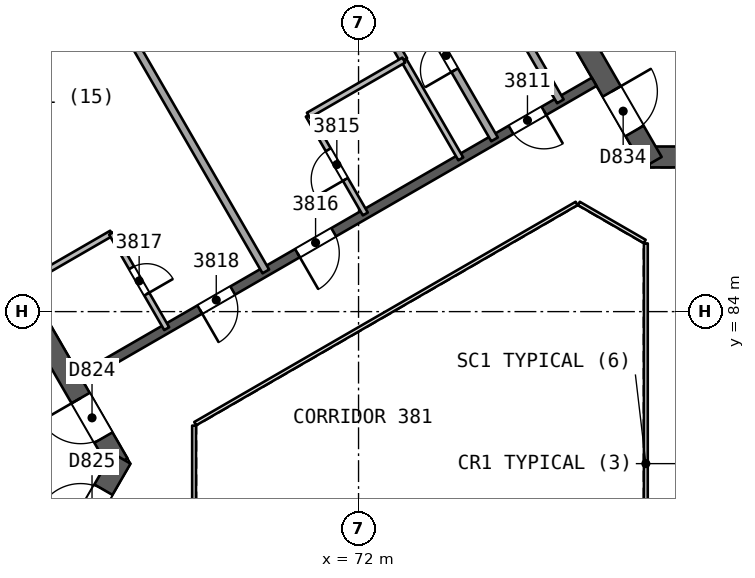
"""IFC4 building model, lengths in metres.
Left out: names, types, materials, properties, quantities, classifications, styles, units other than length and angle.
Written with IfcOpenShell. Run it as: python <this file> out.ifc"""

import sys

from ifc_helpers import new_model, si_unit, direction, frame, frame_2d, origin, place, context, subcontext, project, spatial, rectangle, extrude, element, fill, save


model = new_model("IFC4")
c1 = context("Model", 3, precision=1e-05, world=origin(), true_north=direction((0.0, 1.0)))
c2 = subcontext(c1, "Body", "Model", "MODEL_VIEW")
j1 = project(units=[si_unit("LENGTHUNIT", "METRE"), si_unit("PLANEANGLEUNIT", "RADIAN")], contexts=[c1])
p1 = place(None, origin())
s1 = spatial("IfcSite", under=j1, at=p1, CompositionType="ELEMENT")
p2 = place(p1, origin())
s2 = spatial("IfcBuilding", under=s1, at=p2, CompositionType="ELEMENT")
p3 = place(p2, frame((0.0, 0.0, 160.0)))
s3 = spatial("IfcBuildingStorey", under=s2, at=p3, CompositionType="ELEMENT", Elevation=160.0)
p4 = place(p3, frame((65.682, 80.0, 0.0), z_axis=(0.0, 0.0, 1.0), x_axis=(-0.500000202252, 0.866025287014, 0.0)))
e1 = element("IfcWall", 1, at=p4, inside=s3, PredefinedType="SHEAR", context=c2, shape_type="SweptSolid", body=[
    extrude(rectangle(XDim=10.221, YDim=0.55, at=frame_2d((5.111, 0.0))), origin(), (0.0, 0.0, 1.0), 3.7),
])
p5 = place(p4, frame((0.791, 0.0, 0.0)))
e2 = element("IfcOpeningElement", 2, at=p5, cuts=e1, PredefinedType="OPENING", context=c2, shape_type="SweptSolid", body=[
    extrude(rectangle(XDim=1.2, YDim=2.1, at=frame_2d((0.6, 1.05))), frame((0.0, 0.286, 0.0), z_axis=(0.0, -1.0, 0.0), x_axis=(1.0, 0.0, 0.0)), (0.0, 0.0, 1.0), 0.571),
])
p6 = place(p3, frame((60.709, 71.386, 0.0), z_axis=(0.0, 0.0, 1.0), x_axis=(0.500015938302, 0.866016201606, 0.0)))
e3 = element("IfcWall", 3, at=p6, inside=s3, PredefinedType="SHEAR", context=c2, shape_type="SweptSolid", body=[
    extrude(rectangle(XDim=10.105, YDim=0.55, at=frame_2d((5.053, 0.0))), origin(), (0.0, 0.0, 1.0), 3.7),
])
p7 = place(p6, frame((7.955, 0.0, 0.0)))
e4 = element("IfcOpeningElement", 4, at=p7, cuts=e3, PredefinedType="OPENING", context=c2, shape_type="SweptSolid", body=[
    extrude(rectangle(XDim=1.2, YDim=2.1, at=frame_2d((0.6, 1.05))), frame((0.0, 0.286, 0.0), z_axis=(0.0, -1.0, 0.0), x_axis=(1.0, 0.0, 0.0)), (0.0, 0.0, 1.0), 0.571),
])
p8 = place(p3, frame((79.659, 88.069, 0.0), z_axis=(0.0, 0.0, 1.0), x_axis=(1.0, 0.0, 0.0)))
e5 = element("IfcWall", 5, at=p8, inside=s3, PredefinedType="SHEAR", context=c2, shape_type="SweptSolid", body=[
    extrude(rectangle(XDim=10.221, YDim=0.55, at=frame_2d((5.111, 0.0))), origin(), (0.0, 0.0, 1.0), 3.7),
])
p9 = place(p8, frame((0.791, 0.0, 0.0)))
e6 = element("IfcOpeningElement", 6, at=p9, cuts=e5, PredefinedType="OPENING", context=c2, shape_type="SweptSolid", body=[
    extrude(rectangle(XDim=1.2, YDim=2.1, at=frame_2d((0.6, 1.05))), frame((0.0, 0.286, 0.0), z_axis=(0.0, -1.0, 0.0), x_axis=(1.0, 0.0, 0.0)), (0.0, 0.0, 1.0), 0.571),
])
p10 = place(p3, frame((74.686, 96.683, 0.0), z_axis=(0.0, 0.0, 1.0), x_axis=(0.499997818338, -0.866026663364, 0.0)))
e7 = element("IfcWall", 7, at=p10, inside=s3, PredefinedType="SHEAR", context=c2, shape_type="SweptSolid", body=[
    extrude(rectangle(XDim=10.105, YDim=0.55, at=frame_2d((5.052, 0.0))), origin(), (0.0, 0.0, 1.0), 3.7),
])
p11 = place(p10, frame((7.955, 0.0, 0.0)))
e8 = element("IfcOpeningElement", 8, at=p11, cuts=e7, PredefinedType="OPENING", context=c2, shape_type="SweptSolid", body=[
    extrude(rectangle(XDim=1.2, YDim=2.1, at=frame_2d((0.6, 1.05))), frame((0.0, 0.286, 0.0), z_axis=(0.0, -1.0, 0.0), x_axis=(1.0, 0.0, 0.0)), (0.0, 0.0, 1.0), 0.571),
])
p12 = place(p3, frame((78.2, 90.046, 0.0), z_axis=(0.0, 0.0, 1.0), x_axis=(-0.866026492143, -0.499998114903, 0.0)))
e9 = element("IfcWall", 9, at=p12, inside=s3, PredefinedType="SHEAR", context=c2, shape_type="SweptSolid", body=[
    extrude(rectangle(XDim=15.588, YDim=0.25, at=frame_2d((7.794, 0.0))), origin(), (0.0, 0.0, 1.0), 3.25),
])
p13 = place(p12, frame((1.527, 0.0, 0.0)))
e10 = element("IfcOpeningElement", 10, at=p13, cuts=e9, PredefinedType="OPENING", context=c2, shape_type="SweptSolid", body=[
    extrude(rectangle(XDim=1.0, YDim=2.1, at=frame_2d((0.5, 1.05))), frame((0.0, 0.135, 0.0), z_axis=(0.0, -1.0, 0.0), x_axis=(1.0, 0.0, 0.0)), (0.0, 0.0, 1.0), 0.271),
])
p14 = place(p12, frame((7.915, 0.0, 0.0)))
e11 = element("IfcOpeningElement", 11, at=p14, cuts=e9, PredefinedType="OPENING", context=c2, shape_type="SweptSolid", body=[
    extrude(rectangle(XDim=1.1, YDim=2.1, at=frame_2d((0.55, 1.05))), frame((0.0, 0.135, 0.0), z_axis=(0.0, -1.0, 0.0), x_axis=(1.0, 0.0, 0.0)), (0.0, 0.0, 1.0), 0.271),
])
p15 = place(p12, frame((10.982, 0.0, 0.0)))
e12 = element("IfcOpeningElement", 12, at=p15, cuts=e9, PredefinedType="OPENING", context=c2, shape_type="SweptSolid", body=[
    extrude(rectangle(XDim=1.0, YDim=2.1, at=frame_2d((0.5, 1.05))), frame((0.0, 0.135, 0.0), z_axis=(0.0, -1.0, 0.0), x_axis=(1.0, 0.0, 0.0)), (0.0, 0.0, 1.0), 0.271),
])
p16 = place(p3, frame((75.579, 88.533, 0.0), z_axis=(0.0, 0.0, 1.0), x_axis=(-0.5000018851, 0.866024315419, 0.0)))
e13 = element("IfcWall", 13, at=p16, inside=s3, PredefinedType="PARTITIONING", context=c2, shape_type="SweptSolid", body=[
    extrude(rectangle(XDim=9.0, YDim=0.2, at=frame_2d((4.5, 0.0))), origin(), (0.0, 0.0, 1.0), 3.25),
])
p17 = place(p16, frame((2.1, 0.0, 0.0)))
e14 = element("IfcOpeningElement", 14, at=p17, cuts=e13, PredefinedType="OPENING", context=c2, shape_type="SweptSolid", body=[
    extrude(rectangle(XDim=0.9, YDim=2.1, at=frame_2d((0.45, 1.05))), frame((0.0, 0.11, 0.0), z_axis=(0.0, -1.0, 0.0), x_axis=(1.0, 0.0, 0.0)), (0.0, 0.0, 1.0), 0.221),
])
p18 = place(p3, frame((72.811, 97.327, 0.0), z_axis=(0.0, 0.0, 1.0), x_axis=(0.5000018851, -0.866024315419, 0.0)))
e15 = element("IfcWall", 15, at=p18, inside=s3, PredefinedType="PARTITIONING", context=c2, shape_type="SweptSolid", body=[
    extrude(rectangle(XDim=9.0, YDim=0.2, at=frame_2d((4.5, 0.0))), origin(), (0.0, 0.0, 1.0), 3.25),
])
p19 = place(p3, frame((68.877, 98.088, 0.0), z_axis=(0.0, 0.0, 1.0), x_axis=(0.500001735503, -0.866024401789, 0.0)))
e16 = element("IfcWall", 16, at=p19, inside=s3, PredefinedType="PARTITIONING", context=c2, shape_type="SweptSolid", body=[
    extrude(rectangle(XDim=8.626, YDim=0.2, at=frame_2d((4.313, 0.0))), origin(), (0.0, 0.0, 1.0), 3.25),
])
p20 = place(p3, frame((73.19, 90.617, 0.0), z_axis=(0.0, 0.0, 1.0), x_axis=(0.499990139034, -0.866031096941, 0.0)))
e17 = element("IfcWall", 17, at=p20, inside=s3, PredefinedType="PARTITIONING", context=c2, shape_type="SweptSolid", body=[
    extrude(rectangle(XDim=3.0, YDim=0.15, at=frame_2d((1.5, 0.0))), origin(), (0.0, 0.0, 1.0), 3.25),
])
p21 = place(p3, frame((72.178, 86.569, 0.0), z_axis=(0.0, 0.0, 1.0), x_axis=(-0.499990139034, 0.866031096941, 0.0)))
e18 = element("IfcWall", 18, at=p21, inside=s3, PredefinedType="PARTITIONING", context=c2, shape_type="SweptSolid", body=[
    extrude(rectangle(XDim=3.0, YDim=0.15, at=frame_2d((1.5, 0.0))), origin(), (0.0, 0.0, 1.0), 3.25),
])
p22 = place(p21, frame((1.05, 0.0, 0.0)))
e19 = element("IfcOpeningElement", 19, at=p22, cuts=e18, PredefinedType="OPENING", context=c2, shape_type="SweptSolid", body=[
    extrude(rectangle(XDim=0.9, YDim=2.1, at=frame_2d((0.45, 1.05))), frame((0.0, 0.085, 0.0), z_axis=(0.0, -1.0, 0.0), x_axis=(1.0, 0.0, 0.0)), (0.0, 0.0, 1.0), 0.171),
])
p23 = place(p3, frame((70.678, 89.167, 0.0), z_axis=(0.0, 0.0, 1.0), x_axis=(0.866032775405, 0.499987231761, 0.0)))
e20 = element("IfcWall", 20, at=p23, inside=s3, PredefinedType="PARTITIONING", context=c2, shape_type="SweptSolid", body=[
    extrude(rectangle(XDim=2.9, YDim=0.15, at=frame_2d((1.45, 0.0))), origin(), (0.0, 0.0, 1.0), 3.25),
])
p24 = place(p3, frame((63.747, 95.126, 0.0), z_axis=(0.0, 0.0, 1.0), x_axis=(0.4999987432, -0.866026129397, 0.0)))
e21 = element("IfcWall", 21, at=p24, inside=s3, PredefinedType="PARTITIONING", context=c2, shape_type="SweptSolid", body=[
    extrude(rectangle(XDim=11.626, YDim=0.2, at=frame_2d((5.813, 0.0))), origin(), (0.0, 0.0, 1.0), 3.25),
])
p25 = place(p3, frame((63.422, 84.863, 0.0), z_axis=(0.0, 0.0, 1.0), x_axis=(0.865994240961, 0.500053971709, 0.0)))
e22 = element("IfcWall", 22, at=p25, inside=s3, PredefinedType="PARTITIONING", context=c2, shape_type="SweptSolid", body=[
    extrude(rectangle(XDim=2.401, YDim=0.15, at=frame_2d((1.201, 0.0))), origin(), (0.0, 0.0, 1.0), 3.25),
])
p26 = place(p3, frame((65.502, 86.063, 0.0), z_axis=(0.0, 0.0, 1.0), x_axis=(0.499987231761, -0.866032775405, 0.0)))
e23 = element("IfcWall", 23, at=p26, inside=s3, PredefinedType="PARTITIONING", context=c2, shape_type="SweptSolid", body=[
    extrude(rectangle(XDim=2.9, YDim=0.15, at=frame_2d((1.45, 0.0))), origin(), (0.0, 0.0, 1.0), 3.25),
])
p27 = place(p26, frame((1.05, 0.0, 0.0)))
e24 = element("IfcOpeningElement", 24, at=p27, cuts=e23, PredefinedType="OPENING", context=c2, shape_type="SweptSolid", body=[
    extrude(rectangle(XDim=0.8, YDim=2.1, at=frame_2d((0.4, 1.05))), frame((0.0, 0.085, 0.0), z_axis=(0.0, -1.0, 0.0), x_axis=(1.0, 0.0, 0.0)), (0.0, 0.0, 1.0), 0.171),
])
p28 = place(p3, frame((42.059, 82.777, 0.0), z_axis=(0.0, 0.0, 1.0), x_axis=(0.866025745652, 0.499999407868, 0.0)))
e25 = element("IfcWall", 25, at=p28, inside=s3, PredefinedType="SOLIDWALL", context=c2, shape_type="SweptSolid", body=[
    extrude(rectangle(XDim=54.279, YDim=0.3, at=frame_2d((27.14, 0.0))), origin(), (0.0, 0.0, 1.0), 3.25),
])
p29 = place(p28, frame((26.719, 0.0, 0.0)))
e26 = element("IfcOpeningElement", 26, at=p29, cuts=e25, PredefinedType="OPENING", context=c2, shape_type="SweptSolid", body=[
    extrude(rectangle(XDim=2.4, YDim=2.4, at=frame_2d((1.2, 1.2))), frame((0.0, 0.161, 0.0), z_axis=(0.0, -1.0, 0.0), x_axis=(1.0, 0.0, 0.0)), (0.0, 0.0, 1.0), 0.321),
])
p30 = place(p28, frame((31.708, 0.0, 0.0)))
e27 = element("IfcOpeningElement", 27, at=p30, cuts=e25, PredefinedType="OPENING", context=c2, shape_type="SweptSolid", body=[
    extrude(rectangle(XDim=2.4, YDim=2.4, at=frame_2d((1.2, 1.2))), frame((0.0, 0.161, 0.0), z_axis=(0.0, -1.0, 0.0), x_axis=(1.0, 0.0, 0.0)), (0.0, 0.0, 1.0), 0.321),
])
p31 = place(p28, frame((42.175, 0.0, 0.0)))
e28 = element("IfcOpeningElement", 28, at=p31, cuts=e25, PredefinedType="OPENING", context=c2, shape_type="SweptSolid", body=[
    extrude(rectangle(XDim=2.4, YDim=2.4, at=frame_2d((1.2, 1.2))), frame((0.0, 0.161, 0.0), z_axis=(0.0, -1.0, 0.0), x_axis=(1.0, 0.0, 0.0)), (0.0, 0.0, 1.0), 0.321),
])
p32 = place(p28, frame((11.235, 0.0, 0.0)))
e29 = element("IfcOpeningElement", 29, at=p32, cuts=e25, PredefinedType="OPENING", context=c2, shape_type="SweptSolid", body=[
    extrude(rectangle(XDim=2.4, YDim=2.4, at=frame_2d((1.2, 1.2))), frame((0.0, 0.161, 0.0), z_axis=(0.0, -1.0, 0.0), x_axis=(1.0, 0.0, 0.0)), (0.0, 0.0, 1.0), 0.321),
])
p33 = place(p3, frame((86.77, 89.486, 0.0), z_axis=(0.0, 0.0, 1.0), x_axis=(-0.86601811187, 0.500012629753, 0.0)))
e30 = element("IfcWall", 30, at=p33, inside=s3, PredefinedType="SOLIDWALL", context=c2, shape_type="SweptSolid", body=[
    extrude(rectangle(XDim=10.9, YDim=0.2, at=frame_2d((5.45, 0.0))), origin(), (0.0, 0.0, 1.0), 3.25),
])
p34 = place(p33, frame((0.575, 0.0, 0.0)))
e31 = element("IfcOpeningElement", 31, at=p34, cuts=e30, PredefinedType="OPENING", context=c2, shape_type="SweptSolid", body=[
    extrude(rectangle(XDim=1.1, YDim=2.1, at=frame_2d((0.55, 1.05))), frame((0.0, 0.11, 0.0), z_axis=(0.0, -1.0, 0.0), x_axis=(1.0, 0.0, 0.0)), (0.0, 0.0, 1.0), 0.221),
])
p35 = place(p33, frame((2.825, 0.0, 0.0)))
e32 = element("IfcOpeningElement", 32, at=p35, cuts=e30, PredefinedType="OPENING", context=c2, shape_type="SweptSolid", body=[
    extrude(rectangle(XDim=1.1, YDim=2.1, at=frame_2d((0.55, 1.05))), frame((0.0, 0.11, 0.0), z_axis=(0.0, -1.0, 0.0), x_axis=(1.0, 0.0, 0.0)), (0.0, 0.0, 1.0), 0.221),
])
p36 = place(p33, frame((5.075, 0.0, 0.0)))
e33 = element("IfcOpeningElement", 33, at=p36, cuts=e30, PredefinedType="OPENING", context=c2, shape_type="SweptSolid", body=[
    extrude(rectangle(XDim=1.1, YDim=2.1, at=frame_2d((0.55, 1.05))), frame((0.0, 0.11, 0.0), z_axis=(0.0, -1.0, 0.0), x_axis=(1.0, 0.0, 0.0)), (0.0, 0.0, 1.0), 0.221),
])
p37 = place(p33, frame((7.325, 0.0, 0.0)))
e34 = element("IfcOpeningElement", 34, at=p37, cuts=e30, PredefinedType="OPENING", context=c2, shape_type="SweptSolid", body=[
    extrude(rectangle(XDim=1.1, YDim=2.1, at=frame_2d((0.55, 1.05))), frame((0.0, 0.11, 0.0), z_axis=(0.0, -1.0, 0.0), x_axis=(1.0, 0.0, 0.0)), (0.0, 0.0, 1.0), 0.221),
])
p38 = place(p3, frame((89.33, 90.872, 0.0), z_axis=(0.0, 0.0, 1.0), x_axis=(-0.866027589512, 0.49999621419, 0.0)))
e35 = element("IfcWall", 35, at=p38, inside=s3, PredefinedType="SOLIDWALL", context=c2, shape_type="SweptSolid", body=[
    extrude(rectangle(XDim=10.524, YDim=0.2, at=frame_2d((5.262, 0.0))), origin(), (0.0, 0.0, 1.0), 3.25),
])
p39 = place(p38, frame((0.312, 0.0, 0.0)))
e36 = element("IfcOpeningElement", 36, at=p39, cuts=e35, PredefinedType="OPENING", context=c2, shape_type="SweptSolid", body=[
    extrude(rectangle(XDim=0.9, YDim=2.1, at=frame_2d((0.45, 1.05))), frame((0.0, 0.11, 0.0), z_axis=(0.0, -1.0, 0.0), x_axis=(1.0, 0.0, 0.0)), (0.0, 0.0, 1.0), 0.221),
])
p40 = place(p3, frame((79.56, 74.206, 0.0), z_axis=(0.0, 0.0, 1.0), x_axis=(0.0, 1.0, 0.0)))
e37 = element("IfcWall", 37, at=p40, inside=s3, PredefinedType="PARTITIONING", context=c2, shape_type="SweptSolid", body=[
    extrude(rectangle(XDim=11.588, YDim=0.1, at=frame_2d((5.794, 0.0))), origin(), (0.0, 0.0, 1.0), 3.25),
])
p41 = place(p3, frame((79.53, 85.846, 0.0), z_axis=(0.0, 0.0, 1.0), x_axis=(-0.866041268327, 0.499972520799, 0.0)))
e38 = element("IfcWall", 38, at=p41, inside=s3, PredefinedType="PARTITIONING", context=c2, shape_type="SweptSolid", body=[
    extrude(rectangle(XDim=2.0, YDim=0.1, at=frame_2d((1.0, 0.0))), origin(), (0.0, 0.0, 1.0), 3.25),
])
p42 = place(p3, frame((77.738, 86.846, 0.0), z_axis=(0.0, 0.0, 1.0), x_axis=(-0.866026658274, -0.499997827154, 0.0)))
e39 = element("IfcWall", 39, at=p42, inside=s3, PredefinedType="PARTITIONING", context=c2, shape_type="SweptSolid", body=[
    extrude(rectangle(XDim=11.588, YDim=0.1, at=frame_2d((5.794, 0.0))), origin(), (0.0, 0.0, 1.0), 3.25),
])
p43 = place(p3, frame((67.672, 81.0, 0.0), z_axis=(0.0, 0.0, 1.0), x_axis=(0.0, -1.0, 0.0)))
e40 = element("IfcWall", 40, at=p43, inside=s3, PredefinedType="PARTITIONING", context=c2, shape_type="SweptSolid", body=[
    extrude(rectangle(XDim=2.0, YDim=0.1, at=frame_2d((1.0, 0.0))), origin(), (0.0, 0.0, 1.0), 3.25),
])
p44 = place(p13, origin())
e41 = element("IfcDoor", 41, at=p44, inside=s3, OperationType="SINGLE_SWING_LEFT", PredefinedType="NOTDEFINED", context=c2, shape_type="SweptSolid", body=[
    extrude(rectangle(XDim=1.0, YDim=2.1, at=frame_2d((0.5, 1.05))), frame((0.0, 0.025, 0.0), z_axis=(0.0, -1.0, 0.0), x_axis=(1.0, 0.0, 0.0)), (0.0, 0.0, 1.0), 0.05),
])
fill(e10, e41)
p45 = place(p17, origin())
e42 = element("IfcDoor", 42, at=p45, inside=s3, OperationType="SINGLE_SWING_LEFT", PredefinedType="NOTDEFINED", context=c2, shape_type="SweptSolid", body=[
    extrude(rectangle(XDim=0.9, YDim=2.1, at=frame_2d((0.45, 1.05))), frame((0.0, 0.025, 0.0), z_axis=(0.0, -1.0, 0.0), x_axis=(1.0, 0.0, 0.0)), (0.0, 0.0, 1.0), 0.05),
])
fill(e14, e42)
p46 = place(p22, origin())
e43 = element("IfcDoor", 43, at=p46, inside=s3, OperationType="SINGLE_SWING_LEFT", PredefinedType="NOTDEFINED", context=c2, shape_type="SweptSolid", body=[
    extrude(rectangle(XDim=0.9, YDim=2.1, at=frame_2d((0.45, 1.05))), frame((0.0, 0.025, 0.0), z_axis=(0.0, -1.0, 0.0), x_axis=(1.0, 0.0, 0.0)), (0.0, 0.0, 1.0), 0.05),
])
fill(e19, e43)
p47 = place(p14, origin())
e44 = element("IfcDoor", 44, at=p47, inside=s3, OperationType="SINGLE_SWING_RIGHT", PredefinedType="NOTDEFINED", context=c2, shape_type="SweptSolid", body=[
    extrude(rectangle(XDim=1.1, YDim=2.1, at=frame_2d((0.55, 1.05))), frame((0.0, 0.025, 0.0), z_axis=(0.0, -1.0, 0.0), x_axis=(1.0, 0.0, 0.0)), (0.0, 0.0, 1.0), 0.05),
])
fill(e11, e44)
p48 = place(p27, origin())
e45 = element("IfcDoor", 45, at=p48, inside=s3, OperationType="SINGLE_SWING_RIGHT", PredefinedType="NOTDEFINED", context=c2, shape_type="SweptSolid", body=[
    extrude(rectangle(XDim=0.8, YDim=2.1, at=frame_2d((0.4, 1.05))), frame((0.0, 0.025, 0.0), z_axis=(0.0, -1.0, 0.0), x_axis=(1.0, 0.0, 0.0)), (0.0, 0.0, 1.0), 0.05),
])
fill(e24, e45)
p49 = place(p15, origin())
e46 = element("IfcDoor", 46, at=p49, inside=s3, OperationType="SINGLE_SWING_RIGHT", PredefinedType="NOTDEFINED", context=c2, shape_type="SweptSolid", body=[
    extrude(rectangle(XDim=1.0, YDim=2.1, at=frame_2d((0.5, 1.05))), frame((0.0, 0.025, 0.0), z_axis=(0.0, -1.0, 0.0), x_axis=(1.0, 0.0, 0.0)), (0.0, 0.0, 1.0), 0.05),
])
fill(e12, e46)
p50 = place(p5, origin())
e47 = element("IfcDoor", 47, at=p50, inside=s3, OperationType="SINGLE_SWING_RIGHT", PredefinedType="NOTDEFINED", context=c2, shape_type="SweptSolid", body=[
    extrude(rectangle(XDim=1.2, YDim=2.1, at=frame_2d((0.6, 1.05))), frame((0.0, 0.025, 0.0), z_axis=(0.0, -1.0, 0.0), x_axis=(1.0, 0.0, 0.0)), (0.0, 0.0, 1.0), 0.05),
])
fill(e2, e47)
p51 = place(p7, origin())
e48 = element("IfcDoor", 48, at=p51, inside=s3, OperationType="SINGLE_SWING_LEFT", PredefinedType="NOTDEFINED", context=c2, shape_type="SweptSolid", body=[
    extrude(rectangle(XDim=1.2, YDim=2.1, at=frame_2d((0.6, 1.05))), frame((0.0, 0.025, 0.0), z_axis=(0.0, -1.0, 0.0), x_axis=(1.0, 0.0, 0.0)), (0.0, 0.0, 1.0), 0.05),
])
fill(e4, e48)
p52 = place(p11, origin())
e49 = element("IfcDoor", 49, at=p52, inside=s3, OperationType="SINGLE_SWING_LEFT", PredefinedType="NOTDEFINED", context=c2, shape_type="SweptSolid", body=[
    extrude(rectangle(XDim=1.2, YDim=2.1, at=frame_2d((0.6, 1.05))), frame((0.0, 0.025, 0.0), z_axis=(0.0, -1.0, 0.0), x_axis=(1.0, 0.0, 0.0)), (0.0, 0.0, 1.0), 0.05),
])
fill(e8, e49)
save(model, sys.argv[1])
